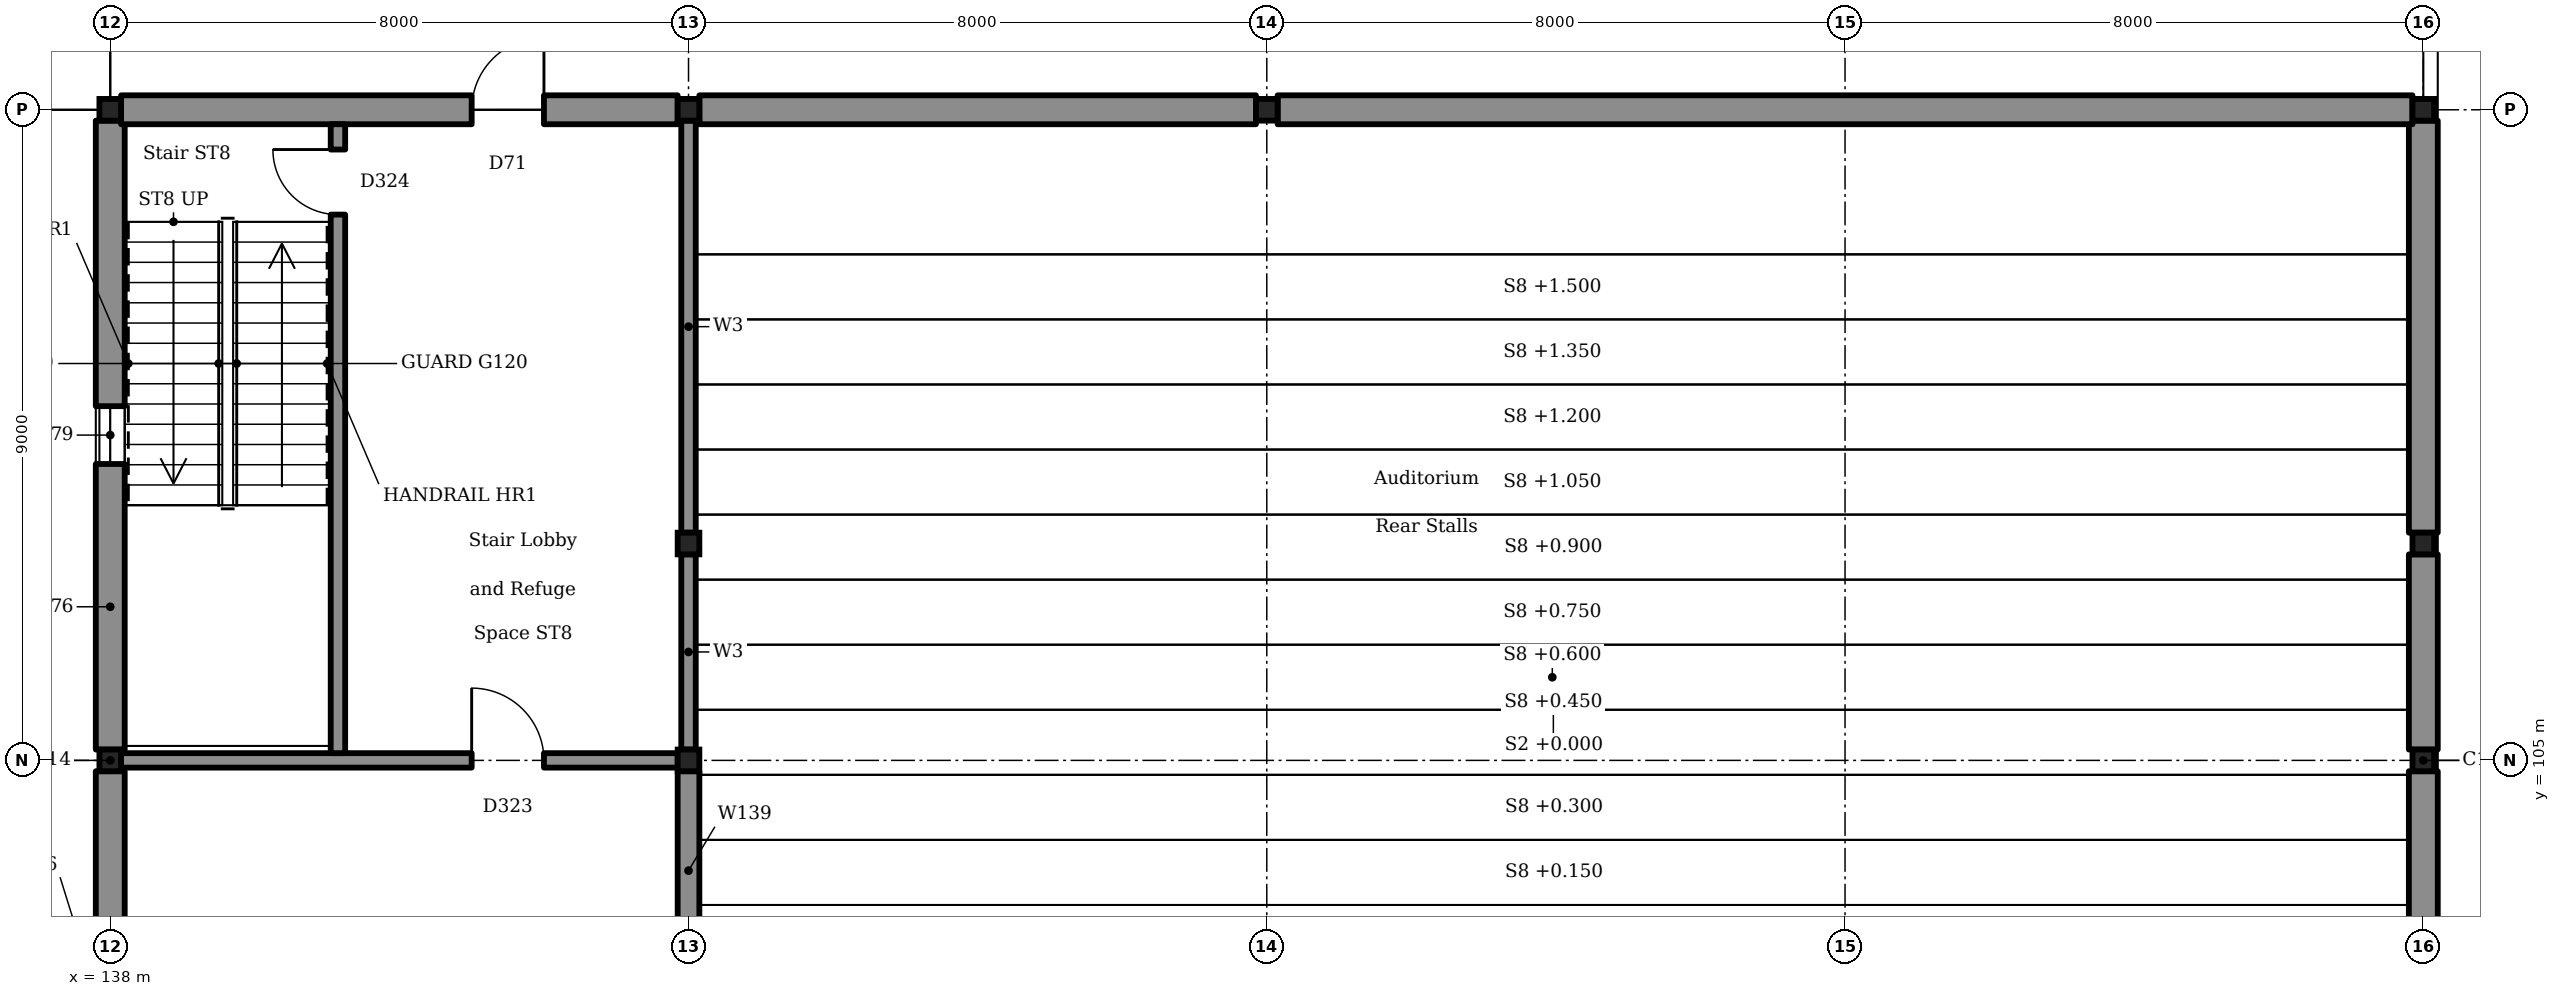
"""IFC4 building model, lengths in metres.
Left out: names, types, materials, properties, quantities, classifications, styles, units other than length and angle.
Written with IfcOpenShell. Run it as: python <this file> out.ifc"""

import sys

from ifc_helpers import new_model, si_unit, direction, frame, frame_2d, origin, origin_2d, place, context, subcontext, project, spatial, rectangle, i_section, extrude, element, fill, save


model = new_model("IFC4")
c1 = context("Model", 3, precision=1e-05, world=origin(), true_north=direction((0.0, 1.0)))
c2 = subcontext(c1, "Body", "Model", "MODEL_VIEW")
j1 = project(units=[si_unit("LENGTHUNIT", "METRE"), si_unit("PLANEANGLEUNIT", "RADIAN")], contexts=[c1])
p1 = place(None, origin())
s1 = spatial("IfcSite", under=j1, at=p1, CompositionType="ELEMENT")
p2 = place(p1, origin())
s2 = spatial("IfcBuilding", under=s1, at=p2, CompositionType="ELEMENT")
p3 = place(p2, origin())
s3 = spatial("IfcBuildingStorey", under=s2, at=p3, CompositionType="ELEMENT", Elevation=0.0)
for number, where, z_axis, x_axis in (
    (1, (138.0, 105.0, 0.0), (0.0, 0.0, 1.0), (1.0, 0.0, 0.0)),
    (2, (170.0, 105.0, 0.0), (0.0, 0.0, 1.0), (1.0, 0.0, 0.0)),
    (3, (138.0, 114.0, 0.0), (0.0, 0.0, 1.0), (1.0, 0.0, 0.0)),
    (4, (170.0, 114.0, 0.0), (0.0, 0.0, 1.0), (1.0, 0.0, 0.0)),
    (5, (146.0, 108.0, 0.0), (0.0, 0.0, 1.0), (1.0, 0.0, 0.0)),
    (6, (146.0, 105.0, 0.0), (0.0, 0.0, 1.0), (1.0, 0.0, 0.0)),
    (7, (146.0, 114.0, 0.0), (0.0, 0.0, 1.0), (1.0, 0.0, 0.0)),
    (8, (154.0, 114.0, 0.0), (0.0, 0.0, 1.0), (1.0, 0.0, 0.0)),
    (9, (170.0, 108.0, 0.0), (0.0, 0.0, 1.0), (1.0, 0.0, 0.0)),
):
    element("IfcColumn", number, at=place(p3, frame(where, z_axis=z_axis, x_axis=x_axis)), inside=s3, PredefinedType="COLUMN", context=c2, shape_type="SweptSolid", body=[
        extrude(i_section(OverallWidth=0.3, OverallDepth=0.3, WebThickness=0.011, FlangeThickness=0.019, FilletRadius=0.027, at=origin_2d()), origin(), (0.0, 0.0, 1.0), 5.4),
    ])
p4 = place(p3, frame((138.0, 96.15, 0.0), z_axis=(0.0, 0.0, 1.0), x_axis=(0.0, 1.0, 0.0)))
e10 = element("IfcWall", 10, at=p4, inside=s3, PredefinedType="SOLIDWALL", context=c2, shape_type="SweptSolid", body=[
    extrude(rectangle(XDim=8.7, YDim=0.4, at=frame_2d((4.35, 0.0))), origin(), (0.0, 0.0, 1.0), 5.15),
])
p5 = place(p4, frame((3.45, 0.0, 0.0)))
e11 = element("IfcOpeningElement", 11, at=p5, cuts=e10, PredefinedType="OPENING", context=c2, shape_type="SweptSolid", body=[
    extrude(rectangle(XDim=1.8, YDim=2.4, at=frame_2d((0.9, 1.2))), frame((0.0, 0.21, 0.0), z_axis=(0.0, -1.0, 0.0), x_axis=(1.0, 0.0, 0.0)), (0.0, 0.0, 1.0), 0.42),
])
p6 = place(p3, frame((138.0, 105.15, 0.0), z_axis=(0.0, 0.0, 1.0), x_axis=(0.0, 1.0, 0.0)))
e12 = element("IfcWall", 12, at=p6, inside=s3, PredefinedType="SOLIDWALL", context=c2, shape_type="SweptSolid", body=[
    extrude(rectangle(XDim=8.7, YDim=0.4, at=frame_2d((4.35, 0.0))), origin(), (0.0, 0.0, 1.0), 5.15),
])
p7 = place(p6, frame((3.95, 0.0, 0.9)))
e13 = element("IfcOpeningElement", 13, at=p7, cuts=e12, PredefinedType="OPENING", context=c2, shape_type="SweptSolid", body=[
    extrude(rectangle(XDim=0.8, YDim=2.6, at=frame_2d((0.4, 1.3))), frame((0.0, 0.21, 0.0), z_axis=(0.0, -1.0, 0.0), x_axis=(1.0, 0.0, 0.0)), (0.0, 0.0, 1.0), 0.42),
])
p8 = place(p3, frame((170.0, 96.15, 0.0), z_axis=(0.0, 0.0, 1.0), x_axis=(0.0, 1.0, 0.0)))
e14 = element("IfcWall", 14, at=p8, inside=s3, PredefinedType="SOLIDWALL", context=c2, shape_type="SweptSolid", body=[
    extrude(rectangle(XDim=8.7, YDim=0.4, at=frame_2d((4.35, 0.0))), origin(), (0.0, 0.0, 1.0), 13.95),
])
p9 = place(p3, frame((170.0, 105.15, 0.0), z_axis=(0.0, 0.0, 1.0), x_axis=(0.0, 1.0, 0.0)))
e15 = element("IfcWall", 15, at=p9, inside=s3, PredefinedType="SOLIDWALL", context=c2, shape_type="SweptSolid", body=[
    extrude(rectangle(XDim=2.7, YDim=0.4, at=frame_2d((1.35, 0.0))), origin(), (0.0, 0.0, 1.0), 5.25),
])
p10 = place(p3, frame((170.0, 108.15, 0.0), z_axis=(0.0, 0.0, 1.0), x_axis=(0.0, 1.0, 0.0)))
e16 = element("IfcWall", 16, at=p10, inside=s3, PredefinedType="SOLIDWALL", context=c2, shape_type="SweptSolid", body=[
    extrude(rectangle(XDim=5.7, YDim=0.4, at=frame_2d((2.85, 0.0))), origin(), (0.0, 0.0, 1.0), 5.25),
])
p11 = place(p3, frame((138.15, 114.0, 0.0), z_axis=(0.0, 0.0, 1.0), x_axis=(1.0, 0.0, 0.0)))
e17 = element("IfcWall", 17, at=p11, inside=s3, PredefinedType="SOLIDWALL", context=c2, shape_type="SweptSolid", body=[
    extrude(rectangle(XDim=7.7, YDim=0.4, at=frame_2d((3.85, 0.0))), origin(), (0.0, 0.0, 1.0), 5.15),
])
p12 = place(p11, frame((4.85, 0.0, 0.0)))
e18 = element("IfcOpeningElement", 18, at=p12, cuts=e17, PredefinedType="OPENING", context=c2, shape_type="SweptSolid", body=[
    extrude(rectangle(XDim=1.0, YDim=2.1, at=frame_2d((0.5, 1.05))), frame((0.0, 0.21, 0.0), z_axis=(0.0, -1.0, 0.0), x_axis=(1.0, 0.0, 0.0)), (0.0, 0.0, 1.0), 0.42),
])
p13 = place(p3, frame((146.15, 114.0, 0.0), z_axis=(0.0, 0.0, 1.0), x_axis=(1.0, 0.0, 0.0)))
e19 = element("IfcWall", 19, at=p13, inside=s3, PredefinedType="SOLIDWALL", context=c2, shape_type="SweptSolid", body=[
    extrude(rectangle(XDim=7.7, YDim=0.4, at=frame_2d((3.85, 0.0))), origin(), (0.0, 0.0, 1.0), 5.25),
])
p14 = place(p3, frame((154.15, 114.0, 0.0), z_axis=(0.0, 0.0, 1.0), x_axis=(1.0, 0.0, 0.0)))
e20 = element("IfcWall", 20, at=p14, inside=s3, PredefinedType="SOLIDWALL", context=c2, shape_type="SweptSolid", body=[
    extrude(rectangle(XDim=15.7, YDim=0.4, at=frame_2d((7.85, 0.0))), origin(), (0.0, 0.0, 1.0), 5.25),
])
p15 = place(p3, frame((146.0, 96.15, 0.0), z_axis=(0.0, 0.0, 1.0), x_axis=(0.0, 1.0, 0.0)))
e21 = element("IfcWall", 21, at=p15, inside=s3, PredefinedType="SOLIDWALL", context=c2, shape_type="SweptSolid", body=[
    extrude(rectangle(XDim=8.7, YDim=0.3, at=frame_2d((4.35, 0.0))), origin(), (0.0, 0.0, 1.0), 5.15),
])
p16 = place(p15, frame((1.85, 0.0, 0.0)))
e22 = element("IfcOpeningElement", 22, at=p16, cuts=e21, PredefinedType="OPENING", context=c2, shape_type="SweptSolid", body=[
    extrude(rectangle(XDim=1.7, YDim=2.4, at=frame_2d((0.85, 1.2))), frame((0.0, 0.16, 0.0), z_axis=(0.0, -1.0, 0.0), x_axis=(1.0, 0.0, 0.0)), (0.0, 0.0, 1.0), 0.32),
])
p17 = place(p15, frame((4.25, 0.0, 0.0)))
e23 = element("IfcOpeningElement", 23, at=p17, cuts=e21, PredefinedType="OPENING", context=c2, shape_type="SweptSolid", body=[
    extrude(rectangle(XDim=1.7, YDim=2.4, at=frame_2d((0.85, 1.2))), frame((0.0, 0.16, 0.0), z_axis=(0.0, -1.0, 0.0), x_axis=(1.0, 0.0, 0.0)), (0.0, 0.0, 1.0), 0.32),
])
p18 = place(p3, frame((146.0, 105.15, 0.0), z_axis=(0.0, 0.0, 1.0), x_axis=(0.0, 1.0, 0.0)))
e24 = element("IfcWall", 24, at=p18, inside=s3, PredefinedType="SOLIDWALL", context=c2, shape_type="SweptSolid", body=[
    extrude(rectangle(XDim=2.7, YDim=0.2, at=frame_2d((1.35, 0.0))), origin(), (0.0, 0.0, 1.0), 5.15),
])
p19 = place(p3, frame((146.0, 108.15, 0.0), z_axis=(0.0, 0.0, 1.0), x_axis=(0.0, 1.0, 0.0)))
e25 = element("IfcWall", 25, at=p19, inside=s3, PredefinedType="SOLIDWALL", context=c2, shape_type="SweptSolid", body=[
    extrude(rectangle(XDim=5.7, YDim=0.2, at=frame_2d((2.85, 0.0))), origin(), (0.0, 0.0, 1.0), 5.15),
])
p20 = place(p3, frame((138.15, 105.0, 0.0), z_axis=(0.0, 0.0, 1.0), x_axis=(1.0, 0.0, 0.0)))
e26 = element("IfcWall", 26, at=p20, inside=s3, PredefinedType="SOLIDWALL", context=c2, shape_type="SweptSolid", body=[
    extrude(rectangle(XDim=7.7, YDim=0.2, at=frame_2d((3.85, 0.0))), origin(), (0.0, 0.0, 1.0), 5.15),
])
p21 = place(p20, frame((4.85, 0.0, 0.0)))
e27 = element("IfcOpeningElement", 27, at=p21, cuts=e26, PredefinedType="OPENING", context=c2, shape_type="SweptSolid", body=[
    extrude(rectangle(XDim=1.0, YDim=2.1, at=frame_2d((0.5, 1.05))), frame((0.0, 0.11, 0.0), z_axis=(0.0, -1.0, 0.0), x_axis=(1.0, 0.0, 0.0)), (0.0, 0.0, 1.0), 0.22),
])
p22 = place(p3, frame((141.15, 105.1, 0.0), z_axis=(0.0, 0.0, 1.0), x_axis=(0.0, 1.0, 0.0)))
e28 = element("IfcWall", 28, at=p22, inside=s3, PredefinedType="SOLIDWALL", context=c2, shape_type="SweptSolid", body=[
    extrude(rectangle(XDim=8.7, YDim=0.2, at=frame_2d((4.35, 0.0))), origin(), (0.0, 0.0, 1.0), 5.15),
])
p23 = place(p22, frame((7.45, 0.0, 0.0)))
e29 = element("IfcOpeningElement", 29, at=p23, cuts=e28, PredefinedType="OPENING", context=c2, shape_type="SweptSolid", body=[
    extrude(rectangle(XDim=0.9, YDim=2.1, at=frame_2d((0.45, 1.05))), frame((0.0, 0.11, 0.0), z_axis=(0.0, -1.0, 0.0), x_axis=(1.0, 0.0, 0.0)), (0.0, 0.0, 1.0), 0.22),
])
p24 = place(p7, origin())
e30 = element("IfcWindow", 30, at=p24, inside=s3, PartitioningType="SINGLE_PANEL", PredefinedType="WINDOW", context=c2, shape_type="SweptSolid", body=[
    extrude(rectangle(XDim=0.8, YDim=2.6, at=frame_2d((0.4, 1.3))), frame((0.0, 0.03, 0.0), z_axis=(0.0, -1.0, 0.0), x_axis=(1.0, 0.0, 0.0)), (0.0, 0.0, 1.0), 0.06),
])
fill(e13, e30)
p25 = place(p12, origin())
e31 = element("IfcDoor", 31, at=p25, inside=s3, OperationType="SINGLE_SWING_LEFT", PredefinedType="DOOR", context=c2, shape_type="SweptSolid", body=[
    extrude(rectangle(XDim=1.0, YDim=2.1, at=frame_2d((0.5, 1.05))), frame((0.0, 0.025, 0.0), z_axis=(0.0, -1.0, 0.0), x_axis=(1.0, 0.0, 0.0)), (0.0, 0.0, 1.0), 0.05),
])
fill(e18, e31)
p26 = place(p21, origin())
e32 = element("IfcDoor", 32, at=p26, inside=s3, OperationType="SINGLE_SWING_RIGHT", PredefinedType="DOOR", context=c2, shape_type="SweptSolid", body=[
    extrude(rectangle(XDim=1.0, YDim=2.1, at=frame_2d((0.5, 1.05))), frame((0.0, 0.025, 0.0), z_axis=(0.0, -1.0, 0.0), x_axis=(1.0, 0.0, 0.0)), (0.0, 0.0, 1.0), 0.05),
])
fill(e27, e32)
p27 = place(p23, origin())
e33 = element("IfcDoor", 33, at=p27, inside=s3, OperationType="SINGLE_SWING_LEFT", PredefinedType="DOOR", context=c2, shape_type="SweptSolid", body=[
    extrude(rectangle(XDim=0.9, YDim=2.1, at=frame_2d((0.45, 1.05))), frame((0.0, 0.025, 0.0), z_axis=(0.0, -1.0, 0.0), x_axis=(1.0, 0.0, 0.0)), (0.0, 0.0, 1.0), 0.05),
])
fill(e29, e33)
save(model, sys.argv[1])
